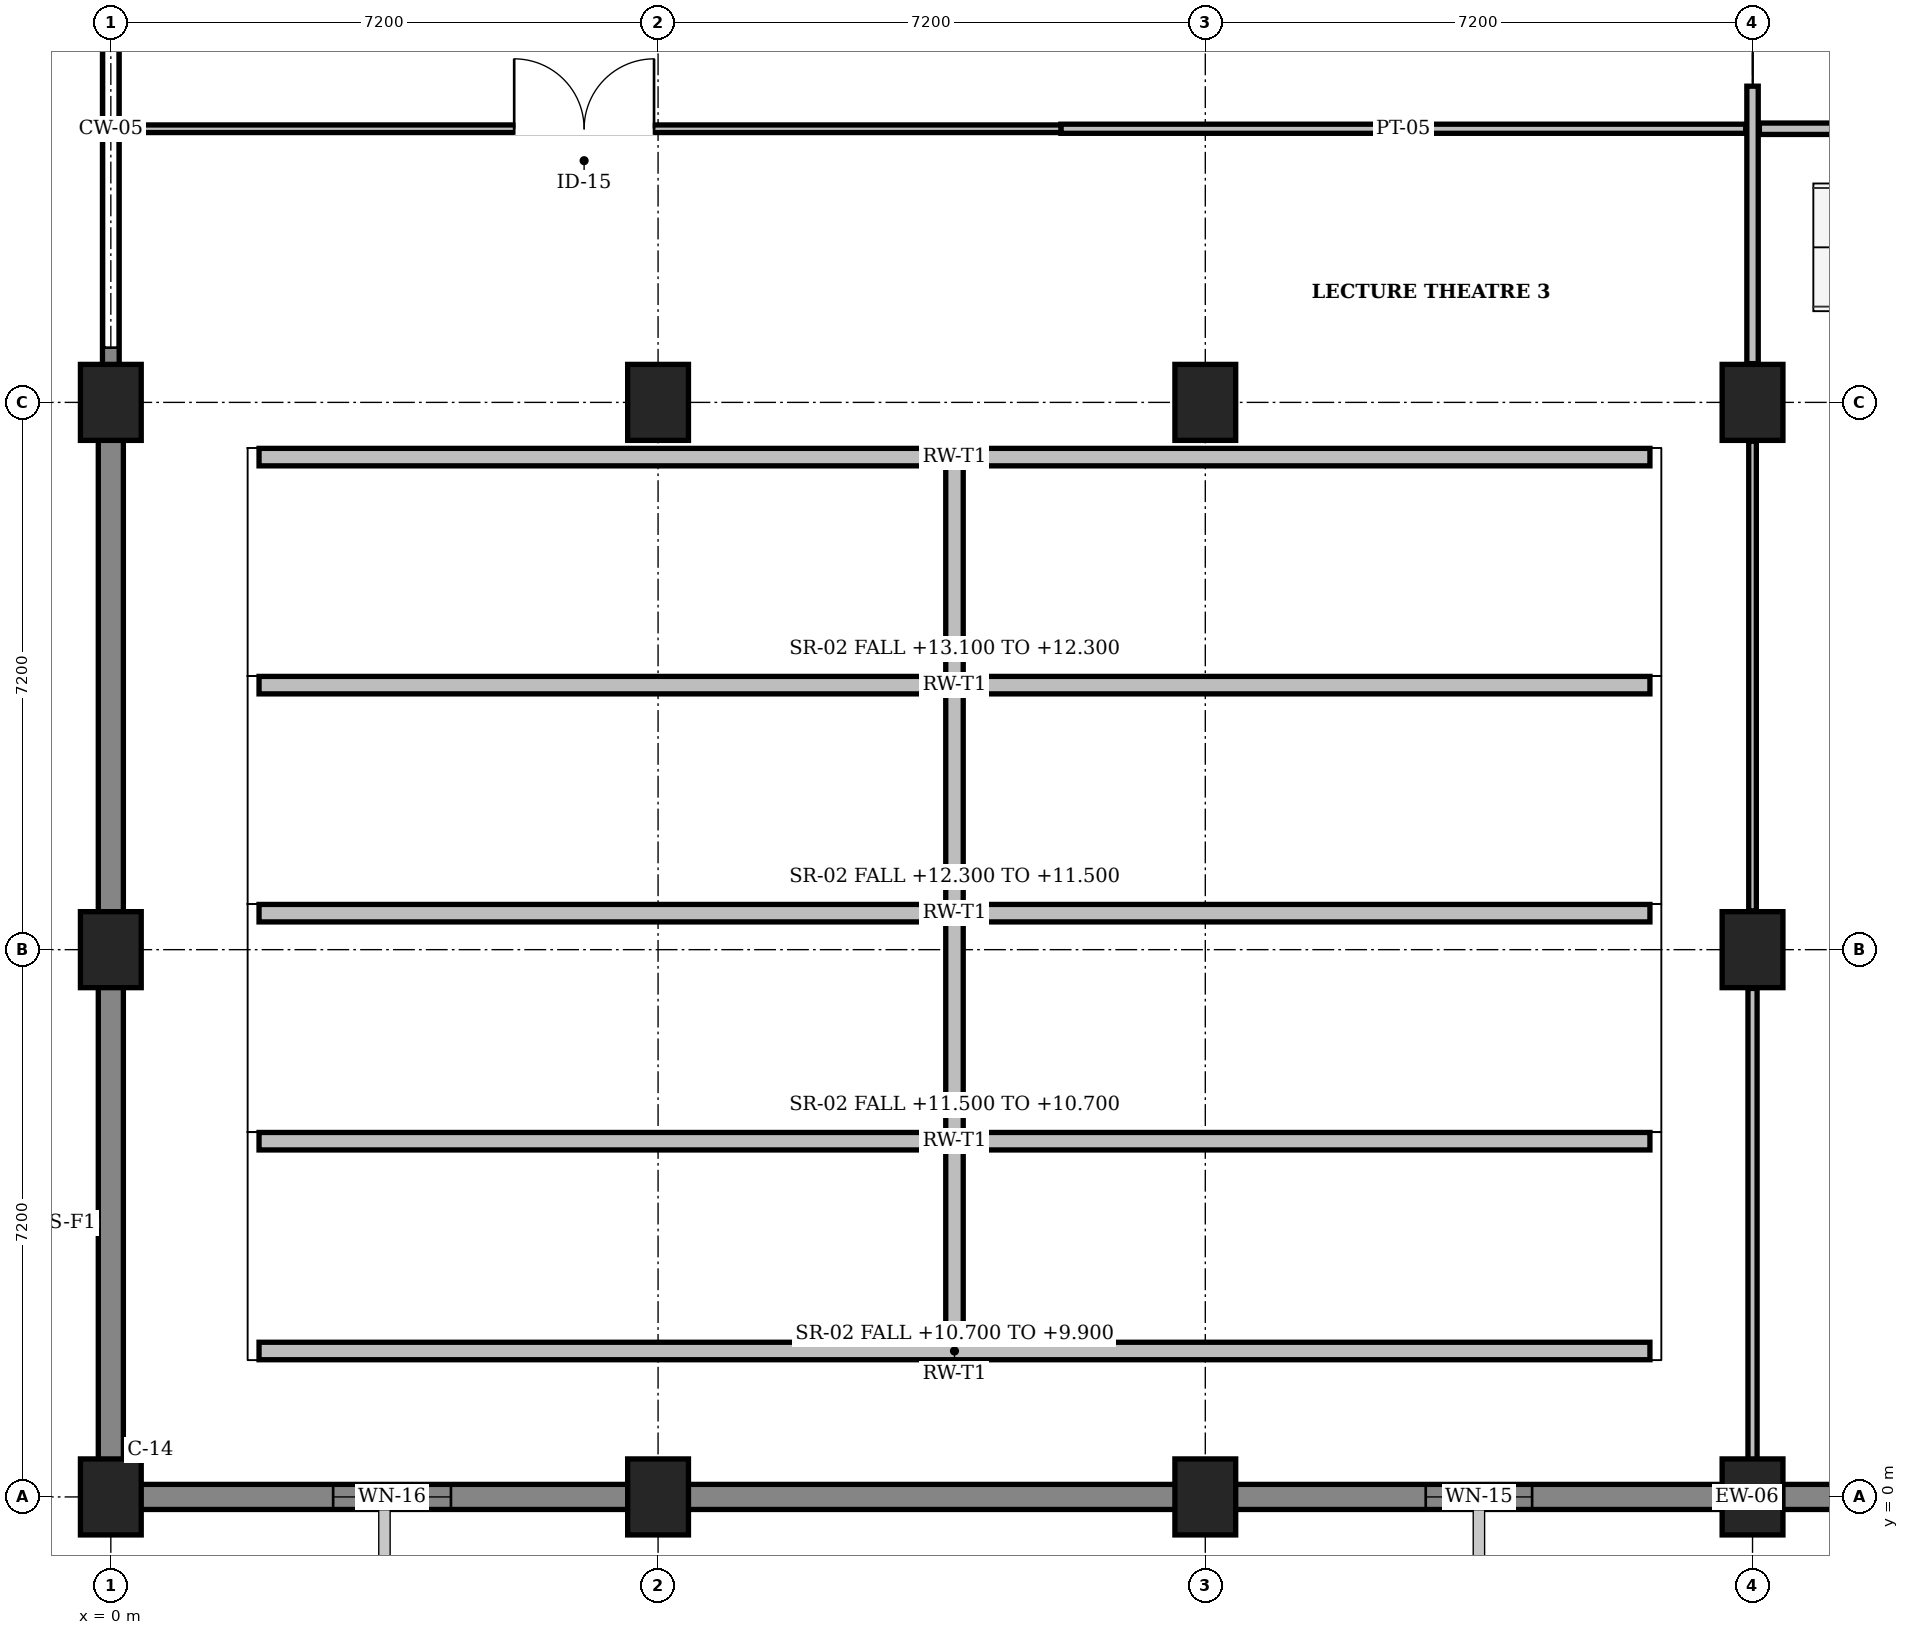
"""IFC4 building model, lengths in metres.
Left out: names, types, materials, properties, quantities, classifications, styles, units other than length and angle.
Written with IfcOpenShell. Run it as: python <this file> out.ifc"""

import sys

from ifc_helpers import new_model, si_unit, direction, frame, frame_2d, origin, origin_2d, place, context, subcontext, project, spatial, rectangle, extrude, element, fill, save


model = new_model("IFC4")
c1 = context("Model", 3, precision=1e-05, world=origin(), true_north=direction((0.0, 1.0)))
c2 = subcontext(c1, "Body", "Model", "MODEL_VIEW")
j1 = project(units=[si_unit("LENGTHUNIT", "METRE"), si_unit("PLANEANGLEUNIT", "RADIAN")], contexts=[c1])
p1 = place(None, origin())
s1 = spatial("IfcSite", under=j1, at=p1, CompositionType="ELEMENT")
p2 = place(p1, origin())
s2 = spatial("IfcBuilding", under=s1, at=p2, CompositionType="ELEMENT")
p3 = place(p2, frame((0.0, 0.0, 9.6)))
s3 = spatial("IfcBuildingStorey", under=s2, at=p3, CompositionType="ELEMENT", Elevation=9.6)
for number, where, z_axis, x_axis in (
    (1, (0.0, 0.0, 0.0), (0.0, 0.0, 1.0), (1.0, 0.0, 0.0)),
    (2, (0.0, 7.2, 0.0), (0.0, 0.0, 1.0), (1.0, 0.0, 0.0)),
    (3, (0.0, 14.4, 0.0), (0.0, 0.0, 1.0), (1.0, 0.0, 0.0)),
    (4, (7.2, 0.0, 0.0), (0.0, 0.0, 1.0), (1.0, 0.0, 0.0)),
    (5, (7.2, 14.4, 0.0), (0.0, 0.0, 1.0), (1.0, 0.0, 0.0)),
    (6, (14.4, 0.0, 0.0), (0.0, 0.0, 1.0), (1.0, 0.0, 0.0)),
    (7, (14.4, 14.4, 0.0), (0.0, 0.0, 1.0), (1.0, 0.0, 0.0)),
    (8, (21.6, 0.0, 0.0), (0.0, 0.0, 1.0), (1.0, 0.0, 0.0)),
    (9, (21.6, 7.2, 0.0), (0.0, 0.0, 1.0), (1.0, 0.0, 0.0)),
    (10, (21.6, 14.4, 0.0), (0.0, 0.0, 1.0), (1.0, 0.0, 0.0)),
):
    element("IfcColumn", number, at=place(p3, frame(where, z_axis=z_axis, x_axis=x_axis)), inside=s3, PredefinedType="COLUMN", context=c2, shape_type="SweptSolid", body=[
        extrude(rectangle(XDim=0.8, YDim=1.0, at=origin_2d()), origin(), (0.0, 0.0, 1.0), 4.8),
    ])
p4 = place(p3, frame((1.95, 1.92, 0.0), z_axis=(0.0, 0.0, 1.0), x_axis=(1.0, 0.0, 0.0)))
e11 = element("IfcWall", 11, at=p4, inside=s3, PredefinedType="SOLIDWALL", context=c2, shape_type="SweptSolid", body=[
    extrude(rectangle(XDim=18.3, YDim=0.23, at=frame_2d((9.15, 0.0))), origin(), (0.0, 0.0, 1.0), 0.13),
])
p5 = place(p3, frame((1.95, 4.68, 0.0), z_axis=(0.0, 0.0, 1.0), x_axis=(1.0, 0.0, 0.0)))
e12 = element("IfcWall", 12, at=p5, inside=s3, PredefinedType="SOLIDWALL", context=c2, shape_type="SweptSolid", body=[
    extrude(rectangle(XDim=18.3, YDim=0.23, at=frame_2d((9.15, 0.0))), origin(), (0.0, 0.0, 1.0), 0.91),
])
p6 = place(p3, frame((11.1, 2.035, 0.0), z_axis=(0.0, 0.0, 1.0), x_axis=(0.0, 1.0, 0.0)))
e13 = element("IfcWall", 13, at=p6, inside=s3, PredefinedType="SOLIDWALL", context=c2, shape_type="SweptSolid", body=[
    extrude(rectangle(XDim=2.53, YDim=0.23, at=frame_2d((1.265, 0.0))), origin(), (0.0, 0.0, 1.0), 0.51),
])
p7 = place(p3, frame((1.95, 7.68, 0.0), z_axis=(0.0, 0.0, 1.0), x_axis=(1.0, 0.0, 0.0)))
e14 = element("IfcWall", 14, at=p7, inside=s3, PredefinedType="SOLIDWALL", context=c2, shape_type="SweptSolid", body=[
    extrude(rectangle(XDim=18.3, YDim=0.23, at=frame_2d((9.15, 0.0))), origin(), (0.0, 0.0, 1.0), 1.71),
])
p8 = place(p3, frame((11.1, 4.795, 0.0), z_axis=(0.0, 0.0, 1.0), x_axis=(0.0, 1.0, 0.0)))
e15 = element("IfcWall", 15, at=p8, inside=s3, PredefinedType="SOLIDWALL", context=c2, shape_type="SweptSolid", body=[
    extrude(rectangle(XDim=2.77, YDim=0.23, at=frame_2d((1.385, 0.0))), origin(), (0.0, 0.0, 1.0), 1.31),
])
p9 = place(p3, frame((1.95, 10.68, 0.0), z_axis=(0.0, 0.0, 1.0), x_axis=(1.0, 0.0, 0.0)))
e16 = element("IfcWall", 16, at=p9, inside=s3, PredefinedType="SOLIDWALL", context=c2, shape_type="SweptSolid", body=[
    extrude(rectangle(XDim=18.3, YDim=0.23, at=frame_2d((9.15, 0.0))), origin(), (0.0, 0.0, 1.0), 2.51),
])
p10 = place(p3, frame((11.1, 7.795, 0.0), z_axis=(0.0, 0.0, 1.0), x_axis=(0.0, 1.0, 0.0)))
e17 = element("IfcWall", 17, at=p10, inside=s3, PredefinedType="SOLIDWALL", context=c2, shape_type="SweptSolid", body=[
    extrude(rectangle(XDim=2.77, YDim=0.23, at=frame_2d((1.385, 0.0))), origin(), (0.0, 0.0, 1.0), 2.11),
])
p11 = place(p3, frame((1.95, 13.68, 0.0), z_axis=(0.0, 0.0, 1.0), x_axis=(1.0, 0.0, 0.0)))
e18 = element("IfcWall", 18, at=p11, inside=s3, PredefinedType="SOLIDWALL", context=c2, shape_type="SweptSolid", body=[
    extrude(rectangle(XDim=18.3, YDim=0.23, at=frame_2d((9.15, 0.0))), origin(), (0.0, 0.0, 1.0), 3.31),
])
p12 = place(p3, frame((11.1, 10.795, 0.0), z_axis=(0.0, 0.0, 1.0), x_axis=(0.0, 1.0, 0.0)))
e19 = element("IfcWall", 19, at=p12, inside=s3, PredefinedType="SOLIDWALL", context=c2, shape_type="SweptSolid", body=[
    extrude(rectangle(XDim=2.77, YDim=0.23, at=frame_2d((1.385, 0.0))), origin(), (0.0, 0.0, 1.0), 2.91),
])
p13 = place(p3, frame((28.8, 0.0, 0.0), z_axis=(0.0, 0.0, 1.0), x_axis=(-1.0, 0.0, 0.0)))
e20 = element("IfcWall", 20, at=p13, inside=s3, PredefinedType="SOLIDWALL", context=c2, shape_type="SweptSolid", body=[
    extrude(rectangle(XDim=7.2, YDim=0.33, at=frame_2d((3.6, 0.0))), origin(), (0.0, 0.0, 1.0), 4.52),
])
p14 = place(p3, frame((21.6, 0.0, 0.0), z_axis=(0.0, 0.0, 1.0), x_axis=(-1.0, 0.0, 0.0)))
e21 = element("IfcWall", 21, at=p14, inside=s3, PredefinedType="SOLIDWALL", context=c2, shape_type="SweptSolid", body=[
    extrude(rectangle(XDim=7.2, YDim=0.33, at=frame_2d((3.6, 0.0))), origin(), (0.0, 0.0, 1.0), 4.52),
])
p15 = place(p14, frame((2.9, 0.0, 0.95)))
e22 = element("IfcOpeningElement", 22, at=p15, cuts=e21, PredefinedType="OPENING", context=c2, shape_type="SweptSolid", body=[
    extrude(rectangle(XDim=1.4, YDim=1.55, at=frame_2d((0.7, 0.775))), frame((0.0, 0.177, 0.0), z_axis=(0.0, -1.0, 0.0), x_axis=(1.0, 0.0, 0.0)), (0.0, 0.0, 1.0), 0.354),
])
p16 = place(p3, frame((14.4, 0.0, 0.0), z_axis=(0.0, 0.0, 1.0), x_axis=(-1.0, 0.0, 0.0)))
e23 = element("IfcWall", 23, at=p16, inside=s3, PredefinedType="SOLIDWALL", context=c2, shape_type="SweptSolid", body=[
    extrude(rectangle(XDim=7.2, YDim=0.33, at=frame_2d((3.6, 0.0))), origin(), (0.0, 0.0, 1.0), 4.52),
])
p17 = place(p3, frame((7.2, 0.0, 0.0), z_axis=(0.0, 0.0, 1.0), x_axis=(-1.0, 0.0, 0.0)))
e24 = element("IfcWall", 24, at=p17, inside=s3, PredefinedType="SOLIDWALL", context=c2, shape_type="SweptSolid", body=[
    extrude(rectangle(XDim=7.35, YDim=0.33, at=frame_2d((3.675, 0.0))), origin(), (0.0, 0.0, 1.0), 4.52),
])
p18 = place(p17, frame((2.725, 0.0, 0.95)))
e25 = element("IfcOpeningElement", 25, at=p18, cuts=e24, PredefinedType="OPENING", context=c2, shape_type="SweptSolid", body=[
    extrude(rectangle(XDim=1.55, YDim=1.55, at=frame_2d((0.775, 0.775))), frame((0.0, 0.177, 0.0), z_axis=(0.0, -1.0, 0.0), x_axis=(1.0, 0.0, 0.0)), (0.0, 0.0, 1.0), 0.354),
])
p19 = place(p3, frame((0.0, 0.166, 0.0), z_axis=(0.0, 0.0, 1.0), x_axis=(0.0, 1.0, 0.0)))
e26 = element("IfcWall", 26, at=p19, inside=s3, PredefinedType="SOLIDWALL", context=c2, shape_type="SweptSolid", body=[
    extrude(rectangle(XDim=7.034, YDim=0.33, at=frame_2d((3.517, 0.0))), origin(), (0.0, 0.0, 1.0), 4.52),
])
p20 = place(p3, frame((0.0, 7.2, 0.0), z_axis=(0.0, 0.0, 1.0), x_axis=(0.0, 1.0, 0.0)))
e27 = element("IfcWall", 27, at=p20, inside=s3, PredefinedType="SOLIDWALL", context=c2, shape_type="SweptSolid", body=[
    extrude(rectangle(XDim=7.2, YDim=0.33, at=frame_2d((3.6, 0.0))), origin(), (0.0, 0.0, 1.0), 4.52),
])
p21 = place(p3, frame((0.0, 14.4, 0.0), z_axis=(0.0, 0.0, 1.0), x_axis=(0.0, 1.0, 0.0)))
e28 = element("IfcWall", 28, at=p21, inside=s3, PredefinedType="SOLIDWALL", context=c2, shape_type="SweptSolid", body=[
    extrude(rectangle(XDim=7.2, YDim=0.22, at=frame_2d((3.6, 0.0))), origin(), (0.0, 0.0, 1.0), 1.24),
])
p22 = place(p3, frame((21.6, 0.177, 0.0), z_axis=(0.0, 0.0, 1.0), x_axis=(0.0, 1.0, 0.0)))
e29 = element("IfcWall", 29, at=p22, inside=s3, PredefinedType="PARTITIONING", context=c2, shape_type="SweptSolid", body=[
    extrude(rectangle(XDim=6.513, YDim=0.12, at=frame_2d((3.256, 0.0))), origin(), (0.0, 0.0, 1.0), 4.03),
])
p23 = place(p3, frame((21.6, 7.71, 0.0), z_axis=(0.0, 0.0, 1.0), x_axis=(0.0, 1.0, 0.0)))
e30 = element("IfcWall", 30, at=p23, inside=s3, PredefinedType="PARTITIONING", context=c2, shape_type="SweptSolid", body=[
    extrude(rectangle(XDim=6.18, YDim=0.1, at=frame_2d((3.09, 0.0))), origin(), (0.0, 0.0, 1.0), 4.03),
])
p24 = place(p3, frame((21.6, 14.91, 0.0), z_axis=(0.0, 0.0, 1.0), x_axis=(0.0, 1.0, 0.0)))
e31 = element("IfcWall", 31, at=p24, inside=s3, PredefinedType="PARTITIONING", context=c2, shape_type="SweptSolid", body=[
    extrude(rectangle(XDim=3.65, YDim=0.15, at=frame_2d((1.825, 0.0))), origin(), (0.0, 0.0, 1.0), 4.03),
])
p25 = place(p3, frame((12.5, 18.0, 0.0), z_axis=(0.0, 0.0, 1.0), x_axis=(1.0, 0.0, 0.0)))
e32 = element("IfcWall", 32, at=p25, inside=s3, PredefinedType="PARTITIONING", context=c2, shape_type="SweptSolid", body=[
    extrude(rectangle(XDim=9.01, YDim=0.12, at=frame_2d((4.505, 0.0))), origin(), (0.0, 0.0, 1.0), 4.46),
])
p26 = place(p3, frame((0.122, 18.0, 0.0), z_axis=(0.0, 0.0, 1.0), x_axis=(1.0, 0.0, 0.0)))
e33 = element("IfcWall", 33, at=p26, inside=s3, PredefinedType="PARTITIONING", context=c2, shape_type="SweptSolid", body=[
    extrude(rectangle(XDim=12.378, YDim=0.1, at=frame_2d((6.189, 0.0))), origin(), (0.0, 0.0, 1.0), 4.46),
])
p27 = place(p26, frame((5.185, 0.0, 0.0)))
e34 = element("IfcOpeningElement", 34, at=p27, cuts=e33, PredefinedType="OPENING", context=c2, shape_type="SweptSolid", body=[
    extrude(rectangle(XDim=1.84, YDim=2.3, at=frame_2d((0.92, 1.15))), frame((0.0, 0.062, 0.0), z_axis=(0.0, -1.0, 0.0), x_axis=(1.0, 0.0, 0.0)), (0.0, 0.0, 1.0), 0.124),
])
p28 = place(p3, frame((21.69, 18.0, 0.0), z_axis=(0.0, 0.0, 1.0), x_axis=(1.0, 0.0, 0.0)))
e35 = element("IfcWall", 35, at=p28, inside=s3, PredefinedType="PARTITIONING", context=c2, shape_type="SweptSolid", body=[
    extrude(rectangle(XDim=22.07, YDim=0.15, at=frame_2d((11.035, 0.0))), origin(), (0.0, 0.0, 1.0), 4.46),
])
p29 = place(p28, frame((11.025, 0.0, 0.0)))
e36 = element("IfcOpeningElement", 36, at=p29, cuts=e35, PredefinedType="OPENING", context=c2, shape_type="SweptSolid", body=[
    extrude(rectangle(XDim=1.22, YDim=2.22, at=frame_2d((0.61, 1.11))), frame((0.0, 0.087, 0.0), z_axis=(0.0, -1.0, 0.0), x_axis=(1.0, 0.0, 0.0)), (0.0, 0.0, 1.0), 0.174),
])
p30 = place(p15, origin())
e37 = element("IfcWindow", 37, at=p30, inside=s3, PartitioningType="SINGLE_PANEL", PredefinedType="WINDOW", context=c2, shape_type="SweptSolid", body=[
    extrude(rectangle(XDim=1.4, YDim=1.55, at=frame_2d((0.7, 0.775))), frame((0.0, 0.03, 0.0), z_axis=(0.0, -1.0, 0.0), x_axis=(1.0, 0.0, 0.0)), (0.0, 0.0, 1.0), 0.06),
])
fill(e22, e37)
p31 = place(p18, origin())
e38 = element("IfcWindow", 38, at=p31, inside=s3, PartitioningType="SINGLE_PANEL", PredefinedType="WINDOW", context=c2, shape_type="SweptSolid", body=[
    extrude(rectangle(XDim=1.55, YDim=1.55, at=frame_2d((0.775, 0.775))), frame((0.0, 0.03, 0.0), z_axis=(0.0, -1.0, 0.0), x_axis=(1.0, 0.0, 0.0)), (0.0, 0.0, 1.0), 0.06),
])
fill(e25, e38)
p32 = place(p27, origin())
e39 = element("IfcDoor", 39, at=p32, inside=s3, OperationType="DOUBLE_DOOR_SINGLE_SWING", PredefinedType="DOOR", context=c2, shape_type="SweptSolid", body=[
    extrude(rectangle(XDim=1.84, YDim=2.3, at=frame_2d((0.92, 1.15))), frame((0.0, 0.025, 0.0), z_axis=(0.0, -1.0, 0.0), x_axis=(1.0, 0.0, 0.0)), (0.0, 0.0, 1.0), 0.05),
])
fill(e34, e39)
save(model, sys.argv[1])
